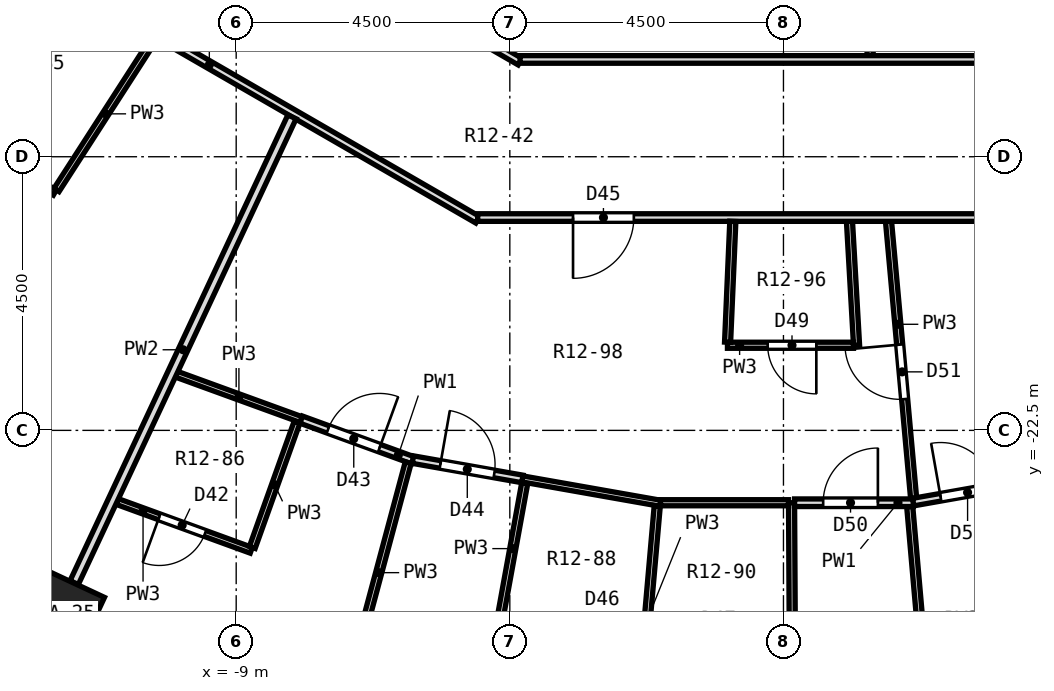
"""IFC4 building model, lengths in metres.
Left out: names, types, materials, properties, quantities, classifications, styles, units other than length and angle.
Written with IfcOpenShell. Run it as: python <this file> out.ifc"""

import sys

from ifc_helpers import new_model, si_unit, direction, frame, frame_2d, origin, origin_2d, place, context, subcontext, project, spatial, polyline, rectangle, outline, extrude, element, fill, save


model = new_model("IFC4")
c1 = context("Model", 3, precision=1e-05, world=origin(), true_north=direction((0.0, 1.0)))
c2 = subcontext(c1, "Body", "Model", "MODEL_VIEW")
j1 = project(units=[si_unit("LENGTHUNIT", "METRE"), si_unit("PLANEANGLEUNIT", "RADIAN")], contexts=[c1])
p1 = place(None, origin())
s1 = spatial("IfcSite", under=j1, at=p1, CompositionType="ELEMENT")
p2 = place(p1, origin())
s2 = spatial("IfcBuilding", under=s1, at=p2, CompositionType="ELEMENT")
p3 = place(p2, frame((0.0, 0.0, 56.0)))
s3 = spatial("IfcBuildingStorey", under=s2, at=p3, CompositionType="ELEMENT", Elevation=56.0)
p4 = place(p3, frame((-11.897, -25.512, 0.0), z_axis=(0.0, 0.0, 1.0), x_axis=(-0.422618261741, -0.906307787037, 0.0)))
e1 = element("IfcColumn", 1, at=p4, inside=s3, PredefinedType="COLUMN", context=c2, shape_type="SweptSolid", body=[
    extrude(rectangle(XDim=1.1, YDim=1.1, at=origin_2d()), origin(), (0.0, 0.0, 1.0), 3.3),
])
p5 = place(p3, origin())
e2 = element("IfcWall", 2, at=p5, inside=s3, PredefinedType="SOLIDWALL", context=c2, shape_type="SweptSolid", body=[
    extrude(outline(polyline([(-11.688, -26.49), (-11.483, -25.926), (-11.631, -26.243), (-12.628, -25.779), (-12.479, -25.461), (-12.78, -25.981), (-11.688, -26.49)])), origin(), (0.0, 0.0, 1.0), 2.75),
])
p6 = place(p3, frame((0.133, -23.69, 0.0), z_axis=(0.0, 0.0, 1.0), x_axis=(0.005625640731, -0.999984175958, 0.0)))
e3 = element("IfcWall", 3, at=p6, inside=s3, PredefinedType="PARTITIONING", context=c2, shape_type="SweptSolid", body=[
    extrude(rectangle(XDim=2.3, YDim=0.1, at=frame_2d((1.15, 0.0))), origin(), (0.0, 0.0, 1.0), 2.75),
])
p7 = place(p3, frame((1.085, -19.062, 0.0), z_axis=(0.0, 0.0, 1.0), x_axis=(0.057060010535, -0.998370750372, 0.0)))
e4 = element("IfcWall", 4, at=p7, inside=s3, PredefinedType="PARTITIONING", context=c2, shape_type="SweptSolid", body=[
    extrude(rectangle(XDim=2.041, YDim=0.1, at=frame_2d((1.021, 0.0))), origin(), (0.0, 0.0, 1.0), 2.75),
])
p8 = place(p3, frame((2.077, -23.752, 0.0), z_axis=(0.0, 0.0, 1.0), x_axis=(0.087439331166, -0.996169846645, 0.0)))
e5 = element("IfcWall", 5, at=p8, inside=s3, PredefinedType="PARTITIONING", context=c2, shape_type="SweptSolid", body=[
    extrude(rectangle(XDim=3.747, YDim=0.1, at=frame_2d((1.874, 0.0))), origin(), (0.0, 0.0, 1.0), 2.75),
])
p9 = place(p3, frame((1.067, -12.2, 0.0), z_axis=(0.0, 0.0, 1.0), x_axis=(0.08728141995, -0.996183694773, 0.0)))
e6 = element("IfcWall", 6, at=p9, inside=s3, PredefinedType="PARTITIONING", context=c2, shape_type="SweptSolid", body=[
    extrude(rectangle(XDim=4.154, YDim=0.1, at=frame_2d((2.077, 0.0))), origin(), (0.0, 0.0, 1.0), 2.75),
])
p10 = place(p3, frame((1.728, -19.062, 0.0), z_axis=(0.0, 0.0, 1.0), x_axis=(0.090314228744, -0.995913319565, 0.0)))
e7 = element("IfcWall", 7, at=p10, inside=s3, PredefinedType="PARTITIONING", context=c2, shape_type="SweptSolid", body=[
    extrude(rectangle(XDim=4.571, YDim=0.1, at=frame_2d((2.286, 0.0))), origin(), (0.0, 0.0, 1.0), 2.75),
])
p11 = place(p10, frame((2.036, 0.0, 0.0)))
e8 = element("IfcOpeningElement", 8, at=p11, cuts=e7, PredefinedType="OPENING", context=c2, shape_type="SweptSolid", body=[
    extrude(rectangle(XDim=0.9, YDim=2.1, at=frame_2d((0.45, 1.05))), frame((0.0, 0.062, 0.0), z_axis=(0.0, -1.0, 0.0), x_axis=(1.0, 0.0, 0.0)), (0.0, 0.0, 1.0), 0.124),
])
p12 = place(p3, frame((-12.675, -18.189, 0.0), z_axis=(0.0, 0.0, 1.0), x_axis=(0.865961984968, -0.500109828528, 0.0)))
e9 = element("IfcWall", 9, at=p12, inside=s3, PredefinedType="PARTITIONING", context=c2, shape_type="SweptSolid", body=[
    extrude(rectangle(XDim=0.8, YDim=0.1, at=frame_2d((0.4, 0.0))), origin(), (0.0, 0.0, 1.0), 2.75),
])
p13 = place(p3, frame((-13.855, -13.94, 0.0), z_axis=(0.0, 0.0, 1.0), x_axis=(0.866024825845, -0.50000100102, 0.0)))
e10 = element("IfcWall", 10, at=p13, inside=s3, PredefinedType="PARTITIONING", context=c2, shape_type="SweptSolid", body=[
    extrude(rectangle(XDim=10.192, YDim=0.125, at=frame_2d((5.096, 0.0))), origin(), (0.0, 0.0, 1.0), 2.75),
])
p14 = place(p13, frame((1.704, 0.0, 0.0)))
e11 = element("IfcOpeningElement", 11, at=p14, cuts=e10, PredefinedType="OPENING", context=c2, shape_type="SweptSolid", body=[
    extrude(rectangle(XDim=0.9, YDim=2.1, at=frame_2d((0.45, 1.05))), frame((0.0, 0.074, 0.0), z_axis=(0.0, -1.0, 0.0), x_axis=(1.0, 0.0, 0.0)), (0.0, 0.0, 1.0), 0.149),
])
p15 = place(p3, frame((-12.006, -12.006, 0.0), z_axis=(0.0, 0.0, 1.0), x_axis=(0.866073188118, -0.499917225971, 0.0)))
e12 = element("IfcWall", 12, at=p15, inside=s3, PredefinedType="PARTITIONING", context=c2, shape_type="SweptSolid", body=[
    extrude(rectangle(XDim=8.861, YDim=0.125, at=frame_2d((4.431, 0.0))), origin(), (0.0, 0.0, 1.0), 2.75),
])
p16 = place(p15, frame((3.945, 0.0, 0.0)))
e13 = element("IfcOpeningElement", 13, at=p16, cuts=e12, PredefinedType="OPENING", context=c2, shape_type="SweptSolid", body=[
    extrude(rectangle(XDim=0.9, YDim=2.1, at=frame_2d((0.45, 1.05))), frame((0.0, 0.074, 0.0), z_axis=(0.0, -1.0, 0.0), x_axis=(1.0, 0.0, 0.0)), (0.0, 0.0, 1.0), 0.149),
])
p17 = place(p3, frame((-10.955, -23.671, 0.0), z_axis=(0.0, 0.0, 1.0), x_axis=(0.939750838969, -0.341860147805, 0.0)))
e14 = element("IfcWall", 14, at=p17, inside=s3, PredefinedType="PARTITIONING", context=c2, shape_type="SweptSolid", body=[
    extrude(rectangle(XDim=2.344, YDim=0.1, at=frame_2d((1.172, 0.0))), origin(), (0.0, 0.0, 1.0), 2.75),
])
p18 = place(p17, frame((0.734, 0.0, 0.0)))
e15 = element("IfcOpeningElement", 15, at=p18, cuts=e14, PredefinedType="OPENING", context=c2, shape_type="SweptSolid", body=[
    extrude(rectangle(XDim=0.8, YDim=2.1, at=frame_2d((0.4, 1.05))), frame((0.0, 0.062, 0.0), z_axis=(0.0, -1.0, 0.0), x_axis=(1.0, 0.0, 0.0)), (0.0, 0.0, 1.0), 0.124),
])
p19 = place(p3, frame((-9.979, -21.578, 0.0), z_axis=(0.0, 0.0, 1.0), x_axis=(0.939731280586, -0.341913907714, 0.0)))
e16 = element("IfcWall", 16, at=p19, inside=s3, PredefinedType="PARTITIONING", context=c2, shape_type="SweptSolid", body=[
    extrude(rectangle(XDim=2.18, YDim=0.1, at=frame_2d((1.09, 0.0))), origin(), (0.0, 0.0, 1.0), 2.75),
])
p20 = place(p3, frame((-7.931, -22.323, 0.0), z_axis=(0.0, 0.0, 1.0), x_axis=(0.9395852567, -0.342314979795, 0.0)))
e17 = element("IfcWall", 17, at=p20, inside=s3, PredefinedType="PARTITIONING", context=c2, shape_type="SweptSolid", body=[
    extrude(rectangle(XDim=1.953, YDim=0.125, at=frame_2d((0.977, 0.0))), origin(), (0.0, 0.0, 1.0), 2.75),
])
p21 = place(p20, frame((0.47, 0.0, 0.0)))
e18 = element("IfcOpeningElement", 18, at=p21, cuts=e17, PredefinedType="OPENING", context=c2, shape_type="SweptSolid", body=[
    extrude(rectangle(XDim=0.9, YDim=2.1, at=frame_2d((0.45, 1.05))), frame((0.0, 0.074, 0.0), z_axis=(0.0, -1.0, 0.0), x_axis=(1.0, 0.0, 0.0)), (0.0, 0.0, 1.0), 0.149),
])
p22 = place(p3, frame((-4.293, -23.298, 0.0), z_axis=(0.0, 0.0, 1.0), x_axis=(0.984801677979, -0.173682627367, 0.0)))
e19 = element("IfcWall", 19, at=p22, inside=s3, PredefinedType="PARTITIONING", context=c2, shape_type="SweptSolid", body=[
    extrude(rectangle(XDim=2.305, YDim=0.1, at=frame_2d((1.153, 0.0))), origin(), (0.0, 0.0, 1.0), 2.75),
])
p23 = place(p3, frame((-6.094, -22.981, 0.0), z_axis=(0.0, 0.0, 1.0), x_axis=(0.984813123205, -0.173617719035, 0.0)))
e20 = element("IfcWall", 20, at=p23, inside=s3, PredefinedType="PARTITIONING", context=c2, shape_type="SweptSolid", body=[
    extrude(rectangle(XDim=1.828, YDim=0.125, at=frame_2d((0.914, 0.0))), origin(), (0.0, 0.0, 1.0), 2.75),
])
p24 = place(p23, frame((0.458, 0.0, 0.0)))
e21 = element("IfcOpeningElement", 21, at=p24, cuts=e20, PredefinedType="OPENING", context=c2, shape_type="SweptSolid", body=[
    extrude(rectangle(XDim=0.9, YDim=2.1, at=frame_2d((0.45, 1.05))), frame((0.0, 0.074, 0.0), z_axis=(0.0, -1.0, 0.0), x_axis=(1.0, 0.0, 0.0)), (0.0, 0.0, 1.0), 0.149),
])
p25 = place(p3, frame((-2.023, -23.69, 0.0), z_axis=(0.0, 0.0, 1.0), x_axis=(1.0, 0.0, 0.0)))
e22 = element("IfcWall", 22, at=p25, inside=s3, PredefinedType="PARTITIONING", context=c2, shape_type="SweptSolid", body=[
    extrude(rectangle(XDim=2.106, YDim=0.1, at=frame_2d((1.053, 0.0))), origin(), (0.0, 0.0, 1.0), 2.75),
])
p26 = place(p3, frame((0.183, -23.69, 0.0), z_axis=(0.0, 0.0, 1.0), x_axis=(1.0, 0.0, 0.0)))
e23 = element("IfcWall", 23, at=p26, inside=s3, PredefinedType="PARTITIONING", context=c2, shape_type="SweptSolid", body=[
    extrude(rectangle(XDim=1.953, YDim=0.125, at=frame_2d((0.977, 0.0))), origin(), (0.0, 0.0, 1.0), 2.75),
])
p27 = place(p26, frame((0.47, 0.0, 0.0)))
e24 = element("IfcOpeningElement", 24, at=p27, cuts=e23, PredefinedType="OPENING", context=c2, shape_type="SweptSolid", body=[
    extrude(rectangle(XDim=0.9, YDim=2.1, at=frame_2d((0.45, 1.05))), frame((0.0, 0.074, 0.0), z_axis=(0.0, -1.0, 0.0), x_axis=(1.0, 0.0, 0.0)), (0.0, 0.0, 1.0), 0.149),
])
p28 = place(p3, frame((-0.921, -21.1, 0.0), z_axis=(0.0, 0.0, 1.0), x_axis=(1.0, 0.0, 0.0)))
e25 = element("IfcWall", 25, at=p28, inside=s3, PredefinedType="PARTITIONING", context=c2, shape_type="SweptSolid", body=[
    extrude(rectangle(XDim=2.073, YDim=0.1, at=frame_2d((1.037, 0.0))), origin(), (0.0, 0.0, 1.0), 2.75),
])
p29 = place(p28, frame((0.662, 0.0, 0.0)))
e26 = element("IfcOpeningElement", 26, at=p29, cuts=e25, PredefinedType="OPENING", context=c2, shape_type="SweptSolid", body=[
    extrude(rectangle(XDim=0.8, YDim=2.1, at=frame_2d((0.4, 1.05))), frame((0.0, 0.062, 0.0), z_axis=(0.0, -1.0, 0.0), x_axis=(1.0, 0.0, 0.0)), (0.0, 0.0, 1.0), 0.124),
])
p30 = place(p3, frame((-5.029, -19.0, 0.0), z_axis=(0.0, 0.0, 1.0), x_axis=(1.0, 0.0, 0.0)))
e27 = element("IfcWall", 27, at=p30, inside=s3, PredefinedType="PARTITIONING", context=c2, shape_type="SweptSolid", body=[
    extrude(rectangle(XDim=10.192, YDim=0.125, at=frame_2d((5.096, 0.0))), origin(), (0.0, 0.0, 1.0), 2.75),
])
p31 = place(p30, frame((1.568, 0.0, 0.0)))
e28 = element("IfcOpeningElement", 28, at=p31, cuts=e27, PredefinedType="OPENING", context=c2, shape_type="SweptSolid", body=[
    extrude(rectangle(XDim=1.0, YDim=2.1, at=frame_2d((0.5, 1.05))), frame((0.0, 0.074, 0.0), z_axis=(0.0, -1.0, 0.0), x_axis=(1.0, 0.0, 0.0)), (0.0, 0.0, 1.0), 0.149),
])
p32 = place(p3, frame((-4.332, -16.4, 0.0), z_axis=(0.0, 0.0, 1.0), x_axis=(1.0, 0.0, 0.0)))
e29 = element("IfcWall", 29, at=p32, inside=s3, PredefinedType="PARTITIONING", context=c2, shape_type="SweptSolid", body=[
    extrude(rectangle(XDim=8.798, YDim=0.125, at=frame_2d((4.399, 0.0))), origin(), (0.0, 0.0, 1.0), 2.75),
])
p33 = place(p3, frame((2.135, -23.679, 0.0), z_axis=(0.0, 0.0, 1.0), x_axis=(0.984774141248, 0.173838691691, 0.0)))
e30 = element("IfcWall", 30, at=p33, inside=s3, PredefinedType="PARTITIONING", context=c2, shape_type="SweptSolid", body=[
    extrude(rectangle(XDim=1.827, YDim=0.125, at=frame_2d((0.914, 0.0))), origin(), (0.0, 0.0, 1.0), 2.75),
])
p34 = place(p33, frame((0.457, 0.0, 0.0)))
e31 = element("IfcOpeningElement", 31, at=p34, cuts=e30, PredefinedType="OPENING", context=c2, shape_type="SweptSolid", body=[
    extrude(rectangle(XDim=0.9, YDim=2.1, at=frame_2d((0.45, 1.05))), frame((0.0, 0.074, 0.0), z_axis=(0.0, -1.0, 0.0), x_axis=(1.0, 0.0, 0.0)), (0.0, 0.0, 1.0), 0.149),
])
p35 = place(p3, frame((-11.955, -18.547, 0.0), z_axis=(0.0, 0.0, 1.0), x_axis=(0.541837653492, 0.840483168932, 0.0)))
e32 = element("IfcWall", 32, at=p35, inside=s3, PredefinedType="PARTITIONING", context=c2, shape_type="SweptSolid", body=[
    extrude(rectangle(XDim=2.98, YDim=0.1, at=frame_2d((1.49, 0.0))), origin(), (0.0, 0.0, 1.0), 2.75),
])
p36 = place(p3, frame((-11.664, -25.003, 0.0), z_axis=(0.0, 0.0, 1.0), x_axis=(0.423588806437, 0.905854581631, 0.0)))
e33 = element("IfcWall", 33, at=p36, inside=s3, PredefinedType="PARTITIONING", context=c2, shape_type="SweptSolid", body=[
    extrude(rectangle(XDim=8.455, YDim=0.15, at=frame_2d((4.227, 0.0))), origin(), (0.0, 0.0, 1.0), 2.75),
])
p37 = place(p3, frame((-8.735, -24.425, 0.0), z_axis=(0.0, 0.0, 1.0), x_axis=(0.336477788464, 0.941691402674, 0.0)))
e34 = element("IfcWall", 34, at=p37, inside=s3, PredefinedType="PARTITIONING", context=c2, shape_type="SweptSolid", body=[
    extrude(rectangle(XDim=2.188, YDim=0.1, at=frame_2d((1.094, 0.0))), origin(), (0.0, 0.0, 1.0), 2.75),
])
p38 = place(p3, frame((-7.141, -26.65, 0.0), z_axis=(0.0, 0.0, 1.0), x_axis=(0.258842464283, 0.965919550834, 0.0)))
e35 = element("IfcWall", 35, at=p38, inside=s3, PredefinedType="PARTITIONING", context=c2, shape_type="SweptSolid", body=[
    extrude(rectangle(XDim=3.747, YDim=0.1, at=frame_2d((1.874, 0.0))), origin(), (0.0, 0.0, 1.0), 2.75),
])
p39 = place(p3, frame((-4.647, -25.521, 0.0), z_axis=(0.0, 0.0, 1.0), x_axis=(0.179130970408, 0.983825236229, 0.0)))
e36 = element("IfcWall", 36, at=p39, inside=s3, PredefinedType="PARTITIONING", context=c2, shape_type="SweptSolid", body=[
    extrude(rectangle(XDim=2.188, YDim=0.1, at=frame_2d((1.094, 0.0))), origin(), (0.0, 0.0, 1.0), 2.75),
])
p40 = place(p3, frame((-2.404, -27.485, 0.0), z_axis=(0.0, 0.0, 1.0), x_axis=(0.087473063517, 0.996166885195, 0.0)))
e37 = element("IfcWall", 37, at=p40, inside=s3, PredefinedType="PARTITIONING", context=c2, shape_type="SweptSolid", body=[
    extrude(rectangle(XDim=3.76, YDim=0.1, at=frame_2d((1.88, 0.0))), origin(), (0.0, 0.0, 1.0), 2.75),
])
p41 = place(p3, frame((-0.919, -21.05, 0.0), z_axis=(0.0, 0.0, 1.0), x_axis=(0.043320061376, 0.999061245511, 0.0)))
e38 = element("IfcWall", 38, at=p41, inside=s3, PredefinedType="PARTITIONING", context=c2, shape_type="SweptSolid", body=[
    extrude(rectangle(XDim=1.99, YDim=0.1, at=frame_2d((0.995, 0.0))), origin(), (0.0, 0.0, 1.0), 2.75),
])
p42 = place(p18, frame((0.8, 0.0, 0.0), z_axis=(0.0, 0.0, 1.0), x_axis=(-1.0, 0.0, 0.0)))
e39 = element("IfcDoor", 39, at=p42, inside=s3, OperationType="SINGLE_SWING_RIGHT", PredefinedType="DOOR", context=c2, shape_type="SweptSolid", body=[
    extrude(rectangle(XDim=0.8, YDim=2.1, at=frame_2d((0.4, 1.05))), frame((0.0, 0.025, 0.0), z_axis=(0.0, -1.0, 0.0), x_axis=(1.0, 0.0, 0.0)), (0.0, 0.0, 1.0), 0.05),
])
fill(e15, e39)
p43 = place(p21, origin())
e40 = element("IfcDoor", 40, at=p43, inside=s3, OperationType="SINGLE_SWING_RIGHT", PredefinedType="DOOR", context=c2, shape_type="SweptSolid", body=[
    extrude(rectangle(XDim=0.9, YDim=2.1, at=frame_2d((0.45, 1.05))), frame((0.0, 0.025, 0.0), z_axis=(0.0, -1.0, 0.0), x_axis=(1.0, 0.0, 0.0)), (0.0, 0.0, 1.0), 0.05),
])
fill(e18, e40)
p44 = place(p24, origin())
e41 = element("IfcDoor", 41, at=p44, inside=s3, OperationType="SINGLE_SWING_LEFT", PredefinedType="DOOR", context=c2, shape_type="SweptSolid", body=[
    extrude(rectangle(XDim=0.9, YDim=2.1, at=frame_2d((0.45, 1.05))), frame((0.0, 0.025, 0.0), z_axis=(0.0, -1.0, 0.0), x_axis=(1.0, 0.0, 0.0)), (0.0, 0.0, 1.0), 0.05),
])
fill(e21, e41)
p45 = place(p31, frame((1.0, 0.0, 0.0), z_axis=(0.0, 0.0, 1.0), x_axis=(-1.0, 0.0, 0.0)))
e42 = element("IfcDoor", 42, at=p45, inside=s3, OperationType="SINGLE_SWING_RIGHT", PredefinedType="DOOR", context=c2, shape_type="SweptSolid", body=[
    extrude(rectangle(XDim=1.0, YDim=2.1, at=frame_2d((0.5, 1.05))), frame((0.0, 0.025, 0.0), z_axis=(0.0, -1.0, 0.0), x_axis=(1.0, 0.0, 0.0)), (0.0, 0.0, 1.0), 0.05),
])
fill(e28, e42)
p46 = place(p29, frame((0.8, 0.0, 0.0), z_axis=(0.0, 0.0, 1.0), x_axis=(-1.0, 0.0, 0.0)))
e43 = element("IfcDoor", 43, at=p46, inside=s3, OperationType="SINGLE_SWING_LEFT", PredefinedType="DOOR", context=c2, shape_type="SweptSolid", body=[
    extrude(rectangle(XDim=0.8, YDim=2.1, at=frame_2d((0.4, 1.05))), frame((0.0, 0.025, 0.0), z_axis=(0.0, -1.0, 0.0), x_axis=(1.0, 0.0, 0.0)), (0.0, 0.0, 1.0), 0.05),
])
fill(e26, e43)
p47 = place(p27, origin())
e44 = element("IfcDoor", 44, at=p47, inside=s3, OperationType="SINGLE_SWING_RIGHT", PredefinedType="DOOR", context=c2, shape_type="SweptSolid", body=[
    extrude(rectangle(XDim=0.9, YDim=2.1, at=frame_2d((0.45, 1.05))), frame((0.0, 0.025, 0.0), z_axis=(0.0, -1.0, 0.0), x_axis=(1.0, 0.0, 0.0)), (0.0, 0.0, 1.0), 0.05),
])
fill(e24, e44)
p48 = place(p11, frame((0.9, 0.0, 0.0), z_axis=(0.0, 0.0, 1.0), x_axis=(-1.0, 0.0, 0.0)))
e45 = element("IfcDoor", 45, at=p48, inside=s3, OperationType="SINGLE_SWING_RIGHT", PredefinedType="DOOR", context=c2, shape_type="SweptSolid", body=[
    extrude(rectangle(XDim=0.9, YDim=2.1, at=frame_2d((0.45, 1.05))), frame((0.0, 0.025, 0.0), z_axis=(0.0, -1.0, 0.0), x_axis=(1.0, 0.0, 0.0)), (0.0, 0.0, 1.0), 0.05),
])
fill(e8, e45)
p49 = place(p34, origin())
e46 = element("IfcDoor", 46, at=p49, inside=s3, OperationType="SINGLE_SWING_LEFT", PredefinedType="DOOR", context=c2, shape_type="SweptSolid", body=[
    extrude(rectangle(XDim=0.9, YDim=2.1, at=frame_2d((0.45, 1.05))), frame((0.0, 0.025, 0.0), z_axis=(0.0, -1.0, 0.0), x_axis=(1.0, 0.0, 0.0)), (0.0, 0.0, 1.0), 0.05),
])
fill(e31, e46)
save(model, sys.argv[1])
